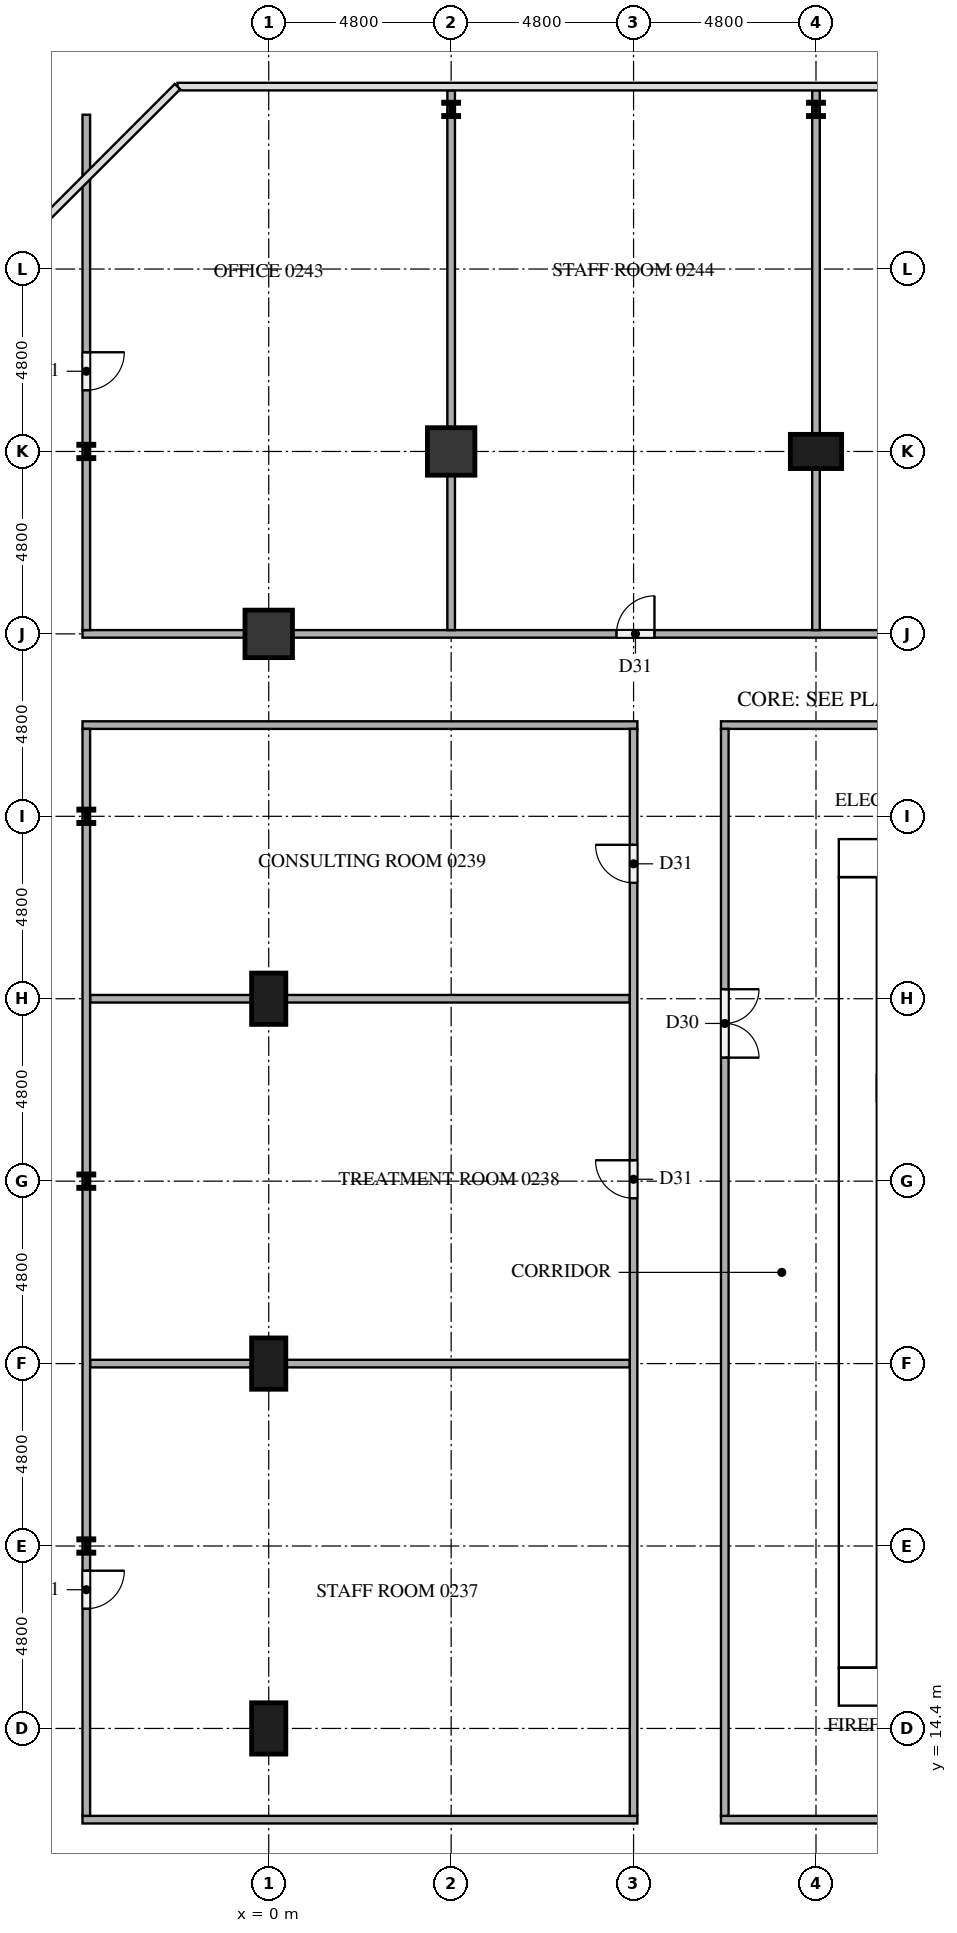
"""IFC4 building model, lengths in metres.
Left out: names, types, materials, properties, quantities, classifications, styles, units other than length and angle.
Written with IfcOpenShell. Run it as: python <this file> out.ifc"""

import sys

from ifc_helpers import new_model, si_unit, direction, frame, frame_2d, origin, origin_2d, place, context, subcontext, project, spatial, rectangle, i_section, extrude, element, fill, save


model = new_model("IFC4")
c1 = context("Model", 3, precision=1e-05, world=origin(), true_north=direction((0.0, 1.0)))
c2 = subcontext(c1, "Body", "Model", "MODEL_VIEW")
j1 = project(units=[si_unit("LENGTHUNIT", "METRE"), si_unit("PLANEANGLEUNIT", "RADIAN")], contexts=[c1])
p1 = place(None, origin())
s1 = spatial("IfcSite", under=j1, at=p1, CompositionType="ELEMENT")
p2 = place(p1, origin())
s2 = spatial("IfcBuilding", under=s1, at=p2, CompositionType="ELEMENT")
p3 = place(p2, frame((0.0, 0.0, 10.5)))
s3 = spatial("IfcBuildingStorey", under=s2, at=p3, CompositionType="ELEMENT", Elevation=10.5)
p4 = place(p3, frame((15.0, 15.5, 0.0), z_axis=(0.0, 0.0, 1.0), x_axis=(1.0, 0.0, 0.0)))
e1 = element("IfcWall", 1, at=p4, inside=s3, PredefinedType="SHEAR", context=c2, shape_type="SweptSolid", body=[
    extrude(rectangle(XDim=32.4, YDim=1.0, at=frame_2d((16.2, 0.0))), origin(), (0.0, 0.0, 1.0), 4.2),
])
p5 = place(p4, frame((15.3, 0.0, 0.0)))
e2 = element("IfcOpeningElement", 2, at=p5, cuts=e1, PredefinedType="OPENING", context=c2, shape_type="SweptSolid", body=[
    extrude(rectangle(XDim=1.8, YDim=2.1, at=frame_2d((0.9, 1.05))), frame((0.0, 0.51, 0.0), z_axis=(0.0, -1.0, 0.0), x_axis=(1.0, 0.0, 0.0)), (0.0, 0.0, 1.0), 1.02),
])
p6 = place(p3, frame((15.0, 37.3, 0.0), z_axis=(0.0, 0.0, 1.0), x_axis=(1.0, 0.0, 0.0)))
e3 = element("IfcWall", 3, at=p6, inside=s3, PredefinedType="SHEAR", context=c2, shape_type="SweptSolid", body=[
    extrude(rectangle(XDim=32.4, YDim=1.0, at=frame_2d((16.2, 0.0))), origin(), (0.0, 0.0, 1.0), 4.2),
])
p7 = place(p6, frame((15.3, 0.0, 0.0)))
e4 = element("IfcOpeningElement", 4, at=p7, cuts=e3, PredefinedType="OPENING", context=c2, shape_type="SweptSolid", body=[
    extrude(rectangle(XDim=1.8, YDim=2.1, at=frame_2d((0.9, 1.05))), frame((0.0, 0.51, 0.0), z_axis=(0.0, -1.0, 0.0), x_axis=(1.0, 0.0, 0.0)), (0.0, 0.0, 1.0), 1.02),
])
p8 = place(p6, frame((1.766, 0.0, 0.0)))
e5 = element("IfcOpeningElement", 5, at=p8, cuts=e3, PredefinedType="OPENING", context=c2, shape_type="SweptSolid", body=[
    extrude(rectangle(XDim=1.0, YDim=2.1, at=frame_2d((0.5, 1.05))), frame((0.0, 0.51, 0.0), z_axis=(0.0, -1.0, 0.0), x_axis=(1.0, 0.0, 0.0)), (0.0, 0.0, 1.0), 1.02),
])
p9 = place(p6, frame((5.241, 0.0, 0.0)))
e6 = element("IfcOpeningElement", 6, at=p9, cuts=e3, PredefinedType="OPENING", context=c2, shape_type="SweptSolid", body=[
    extrude(rectangle(XDim=1.0, YDim=2.1, at=frame_2d((0.5, 1.05))), frame((0.0, 0.51, 0.0), z_axis=(0.0, -1.0, 0.0), x_axis=(1.0, 0.0, 0.0)), (0.0, 0.0, 1.0), 1.02),
])
p10 = place(p3, frame((15.5, 16.0, 0.0), z_axis=(0.0, 0.0, 1.0), x_axis=(0.0, 1.0, 0.0)))
e7 = element("IfcWall", 7, at=p10, inside=s3, PredefinedType="SHEAR", context=c2, shape_type="SweptSolid", body=[
    extrude(rectangle(XDim=20.8, YDim=1.0, at=frame_2d((10.4, 0.0))), origin(), (0.0, 0.0, 1.0), 4.2),
])
p11 = place(p10, frame((4.76, 0.0, 0.0)))
e8 = element("IfcOpeningElement", 8, at=p11, cuts=e7, PredefinedType="OPENING", context=c2, shape_type="SweptSolid", body=[
    extrude(rectangle(XDim=1.2, YDim=2.1, at=frame_2d((0.6, 1.05))), frame((0.0, 0.51, 0.0), z_axis=(0.0, -1.0, 0.0), x_axis=(1.0, 0.0, 0.0)), (0.0, 0.0, 1.0), 1.02),
])
p12 = place(p3, frame((14.4, 48.0, 0.0), z_axis=(0.0, 0.0, 1.0), x_axis=(1.0, 0.0, 0.0)))
e9 = element("IfcColumn", 9, at=p12, inside=s3, PredefinedType="COLUMN", context=c2, shape_type="SweptSolid", body=[
    extrude(rectangle(XDim=1.35, YDim=0.9, at=origin_2d()), origin(), (0.0, 0.0, 1.0), 4.2),
])
for number, where, z_axis, x_axis in (
    (10, (4.8, 48.0, 0.0), (0.0, 0.0, 1.0), (1.0, 0.0, 0.0)),
    (11, (0.0, 43.2, 0.0), (0.0, 0.0, 1.0), (1.0, 0.0, 0.0)),
):
    element("IfcColumn", number, at=place(p3, frame(where, z_axis=z_axis, x_axis=x_axis)), inside=s3, PredefinedType="COLUMN", context=c2, shape_type="SweptSolid", body=[
        extrude(rectangle(XDim=1.25, YDim=1.25, at=origin_2d()), origin(), (0.0, 0.0, 1.0), 4.2),
    ])
for number, where, z_axis, x_axis in (
    (12, (0.0, 33.6, 0.0), (0.0, 0.0, 1.0), (0.0, 1.0, 0.0)),
    (13, (0.0, 24.0, 0.0), (0.0, 0.0, 1.0), (0.0, 1.0, 0.0)),
    (14, (0.0, 14.4, 0.0), (0.0, 0.0, 1.0), (0.0, 1.0, 0.0)),
):
    element("IfcColumn", number, at=place(p3, frame(where, z_axis=z_axis, x_axis=x_axis)), inside=s3, PredefinedType="COLUMN", context=c2, shape_type="SweptSolid", body=[
        extrude(rectangle(XDim=1.35, YDim=0.9, at=origin_2d()), origin(), (0.0, 0.0, 1.0), 4.2),
    ])
for number, where, z_axis, x_axis in (
    (15, (-4.8, 19.2, 0.0), (0.0, 0.0, 1.0), (1.0, 0.0, 0.0)),
    (16, (-4.8, 28.8, 0.0), (0.0, 0.0, 1.0), (1.0, 0.0, 0.0)),
    (17, (-4.8, 38.4, 0.0), (0.0, 0.0, 1.0), (1.0, 0.0, 0.0)),
    (18, (-4.8, 48.0, 0.0), (0.0, 0.0, 1.0), (1.0, 0.0, 0.0)),
    (19, (4.8, 57.0, 0.0), (0.0, 0.0, 1.0), (1.0, 0.0, 0.0)),
    (20, (14.4, 57.0, 0.0), (0.0, 0.0, 1.0), (1.0, 0.0, 0.0)),
):
    element("IfcColumn", number, at=place(p3, frame(where, z_axis=z_axis, x_axis=x_axis)), inside=s3, PredefinedType="COLUMN", context=c2, shape_type="SweptSolid", body=[
        extrude(i_section(OverallWidth=0.396, OverallDepth=0.381, WebThickness=0.019, FlangeThickness=0.03, at=origin_2d()), origin(), (0.0, 0.0, 1.0), 4.2),
    ])
p13 = place(p3, frame((-4.9, 12.0, 0.0), z_axis=(0.0, 0.0, 1.0), x_axis=(1.0, 0.0, 0.0)))
e21 = element("IfcWall", 21, at=p13, inside=s3, PredefinedType="PARTITIONING", context=c2, shape_type="SweptSolid", body=[
    extrude(rectangle(XDim=14.6, YDim=0.2, at=frame_2d((7.3, 0.0))), origin(), (0.0, 0.0, 1.0), 4.2),
])
p14 = place(p3, frame((11.9, 12.0, 0.0), z_axis=(0.0, 0.0, 1.0), x_axis=(1.0, 0.0, 0.0)))
e22 = element("IfcWall", 22, at=p14, inside=s3, PredefinedType="PARTITIONING", context=c2, shape_type="SweptSolid", body=[
    extrude(rectangle(XDim=38.6, YDim=0.2, at=frame_2d((19.3, 0.0))), origin(), (0.0, 0.0, 1.0), 4.2),
])
p15 = place(p14, frame((18.45, 0.0, 0.0)))
e23 = element("IfcOpeningElement", 23, at=p15, cuts=e22, PredefinedType="OPENING", context=c2, shape_type="SweptSolid", body=[
    extrude(rectangle(XDim=1.8, YDim=2.1, at=frame_2d((0.9, 1.05))), frame((0.0, 0.11, 0.0), z_axis=(0.0, -1.0, 0.0), x_axis=(1.0, 0.0, 0.0)), (0.0, 0.0, 1.0), 0.22),
])
for number, where, z_axis, x_axis in (
    (24, (-4.7, 24.0, 0.0), (0.0, 0.0, 1.0), (1.0, 0.0, 0.0)),
    (25, (-4.7, 33.6, 0.0), (0.0, 0.0, 1.0), (1.0, 0.0, 0.0)),
):
    element("IfcWall", number, at=place(p3, frame(where, z_axis=z_axis, x_axis=x_axis)), inside=s3, PredefinedType="PARTITIONING", context=c2, shape_type="SweptSolid", body=[
        extrude(rectangle(XDim=14.2, YDim=0.2, at=frame_2d((7.1, 0.0))), origin(), (0.0, 0.0, 1.0), 4.2),
    ])
p16 = place(p3, frame((-4.9, 40.8, 0.0), z_axis=(0.0, 0.0, 1.0), x_axis=(1.0, 0.0, 0.0)))
e26 = element("IfcWall", 26, at=p16, inside=s3, PredefinedType="PARTITIONING", context=c2, shape_type="SweptSolid", body=[
    extrude(rectangle(XDim=14.6, YDim=0.2, at=frame_2d((7.3, 0.0))), origin(), (0.0, 0.0, 1.0), 4.2),
])
p17 = place(p3, frame((50.5, 40.8, 0.0), z_axis=(0.0, 0.0, 1.0), x_axis=(-1.0, 0.0, 0.0)))
e27 = element("IfcWall", 27, at=p17, inside=s3, PredefinedType="PARTITIONING", context=c2, shape_type="SweptSolid", body=[
    extrude(rectangle(XDim=38.6, YDim=0.2, at=frame_2d((19.3, 0.0))), origin(), (0.0, 0.0, 1.0), 4.2),
])
p18 = place(p17, frame((18.45, 0.0, 0.0)))
e28 = element("IfcOpeningElement", 28, at=p18, cuts=e27, PredefinedType="OPENING", context=c2, shape_type="SweptSolid", body=[
    extrude(rectangle(XDim=1.8, YDim=2.1, at=frame_2d((0.9, 1.05))), frame((0.0, 0.11, 0.0), z_axis=(0.0, -1.0, 0.0), x_axis=(1.0, 0.0, 0.0)), (0.0, 0.0, 1.0), 0.22),
])
p19 = place(p17, frame((16.25, 0.0, 0.0)))
e29 = element("IfcOpeningElement", 29, at=p19, cuts=e27, PredefinedType="OPENING", context=c2, shape_type="SweptSolid", body=[
    extrude(rectangle(XDim=1.8, YDim=2.1, at=frame_2d((0.9, 1.05))), frame((0.0, 0.11, 0.0), z_axis=(0.0, -1.0, 0.0), x_axis=(1.0, 0.0, 0.0)), (0.0, 0.0, 1.0), 0.22),
])
p20 = place(p3, frame((-4.9, 43.2, 0.0), z_axis=(0.0, 0.0, 1.0), x_axis=(1.0, 0.0, 0.0)))
e30 = element("IfcWall", 30, at=p20, inside=s3, PredefinedType="PARTITIONING", context=c2, shape_type="SweptSolid", body=[
    extrude(rectangle(XDim=45.35, YDim=0.2, at=frame_2d((22.675, 0.0))), origin(), (0.0, 0.0, 1.0), 4.2),
])
p21 = place(p20, frame((14.05, 0.0, 0.0)))
e31 = element("IfcOpeningElement", 31, at=p21, cuts=e30, PredefinedType="OPENING", context=c2, shape_type="SweptSolid", body=[
    extrude(rectangle(XDim=1.0, YDim=2.1, at=frame_2d((0.5, 1.05))), frame((0.0, 0.11, 0.0), z_axis=(0.0, -1.0, 0.0), x_axis=(1.0, 0.0, 0.0)), (0.0, 0.0, 1.0), 0.22),
])
p22 = place(p20, frame((23.55, 0.0, 0.0)))
e32 = element("IfcOpeningElement", 32, at=p22, cuts=e30, PredefinedType="OPENING", context=c2, shape_type="SweptSolid", body=[
    extrude(rectangle(XDim=1.0, YDim=2.1, at=frame_2d((0.5, 1.05))), frame((0.0, 0.11, 0.0), z_axis=(0.0, -1.0, 0.0), x_axis=(1.0, 0.0, 0.0)), (0.0, 0.0, 1.0), 0.22),
])
p23 = place(p20, frame((33.25, 0.0, 0.0)))
e33 = element("IfcOpeningElement", 33, at=p23, cuts=e30, PredefinedType="OPENING", context=c2, shape_type="SweptSolid", body=[
    extrude(rectangle(XDim=1.0, YDim=2.1, at=frame_2d((0.5, 1.05))), frame((0.0, 0.11, 0.0), z_axis=(0.0, -1.0, 0.0), x_axis=(1.0, 0.0, 0.0)), (0.0, 0.0, 1.0), 0.22),
])
p24 = place(p3, frame((-4.8, 40.7, 0.0), z_axis=(0.0, 0.0, 1.0), x_axis=(0.0, -1.0, 0.0)))
e34 = element("IfcWall", 34, at=p24, inside=s3, PredefinedType="PARTITIONING", context=c2, shape_type="SweptSolid", body=[
    extrude(rectangle(XDim=28.6, YDim=0.2, at=frame_2d((14.3, 0.0))), origin(), (0.0, 0.0, 1.0), 4.2),
])
p25 = place(p24, frame((22.15, 0.0, 0.0)))
e35 = element("IfcOpeningElement", 35, at=p25, cuts=e34, PredefinedType="OPENING", context=c2, shape_type="SweptSolid", body=[
    extrude(rectangle(XDim=1.0, YDim=2.1, at=frame_2d((0.5, 1.05))), frame((0.0, 0.11, 0.0), z_axis=(0.0, -1.0, 0.0), x_axis=(1.0, 0.0, 0.0)), (0.0, 0.0, 1.0), 0.22),
])
p26 = place(p3, frame((-4.8, 56.86, 0.0), z_axis=(0.0, 0.0, 1.0), x_axis=(0.0, -1.0, 0.0)))
e36 = element("IfcWall", 36, at=p26, inside=s3, PredefinedType="PARTITIONING", context=c2, shape_type="SweptSolid", body=[
    extrude(rectangle(XDim=13.56, YDim=0.2, at=frame_2d((6.78, 0.0))), origin(), (0.0, 0.0, 1.0), 4.2),
])
p27 = place(p26, frame((6.25, 0.0, 0.0)))
e37 = element("IfcOpeningElement", 37, at=p27, cuts=e36, PredefinedType="OPENING", context=c2, shape_type="SweptSolid", body=[
    extrude(rectangle(XDim=1.0, YDim=2.1, at=frame_2d((0.5, 1.05))), frame((0.0, 0.11, 0.0), z_axis=(0.0, -1.0, 0.0), x_axis=(1.0, 0.0, 0.0)), (0.0, 0.0, 1.0), 0.22),
])
p28 = place(p3, frame((4.8, 43.3, 0.0), z_axis=(0.0, 0.0, 1.0), x_axis=(0.0, 1.0, 0.0)))
e38 = element("IfcWall", 38, at=p28, inside=s3, PredefinedType="PARTITIONING", context=c2, shape_type="SweptSolid", body=[
    extrude(rectangle(XDim=14.2, YDim=0.2, at=frame_2d((7.1, 0.0))), origin(), (0.0, 0.0, 1.0), 4.2),
])
p29 = place(p3, frame((9.6, 12.1, 0.0), z_axis=(0.0, 0.0, 1.0), x_axis=(0.0, 1.0, 0.0)))
e39 = element("IfcWall", 39, at=p29, inside=s3, PredefinedType="PARTITIONING", context=c2, shape_type="SweptSolid", body=[
    extrude(rectangle(XDim=28.6, YDim=0.2, at=frame_2d((14.3, 0.0))), origin(), (0.0, 0.0, 1.0), 4.2),
])
p30 = place(p29, frame((16.25, 0.0, 0.0)))
e40 = element("IfcOpeningElement", 40, at=p30, cuts=e39, PredefinedType="OPENING", context=c2, shape_type="SweptSolid", body=[
    extrude(rectangle(XDim=1.0, YDim=2.1, at=frame_2d((0.5, 1.05))), frame((0.0, 0.11, 0.0), z_axis=(0.0, -1.0, 0.0), x_axis=(1.0, 0.0, 0.0)), (0.0, 0.0, 1.0), 0.22),
])
p31 = place(p29, frame((24.55, 0.0, 0.0)))
e41 = element("IfcOpeningElement", 41, at=p31, cuts=e39, PredefinedType="OPENING", context=c2, shape_type="SweptSolid", body=[
    extrude(rectangle(XDim=1.0, YDim=2.1, at=frame_2d((0.5, 1.05))), frame((0.0, 0.11, 0.0), z_axis=(0.0, -1.0, 0.0), x_axis=(1.0, 0.0, 0.0)), (0.0, 0.0, 1.0), 0.22),
])
p32 = place(p3, frame((12.0, 40.7, 0.0), z_axis=(0.0, 0.0, 1.0), x_axis=(0.0, -1.0, 0.0)))
e42 = element("IfcWall", 42, at=p32, inside=s3, PredefinedType="PARTITIONING", context=c2, shape_type="SweptSolid", body=[
    extrude(rectangle(XDim=28.6, YDim=0.2, at=frame_2d((14.3, 0.0))), origin(), (0.0, 0.0, 1.0), 4.2),
])
p33 = place(p32, frame((6.85, 0.0, 0.0)))
e43 = element("IfcOpeningElement", 43, at=p33, cuts=e42, PredefinedType="OPENING", context=c2, shape_type="SweptSolid", body=[
    extrude(rectangle(XDim=1.8, YDim=2.1, at=frame_2d((0.9, 1.05))), frame((0.0, 0.11, 0.0), z_axis=(0.0, -1.0, 0.0), x_axis=(1.0, 0.0, 0.0)), (0.0, 0.0, 1.0), 0.22),
])
p34 = place(p3, frame((14.4, 43.3, 0.0), z_axis=(0.0, 0.0, 1.0), x_axis=(0.0, 1.0, 0.0)))
e44 = element("IfcWall", 44, at=p34, inside=s3, PredefinedType="PARTITIONING", context=c2, shape_type="SweptSolid", body=[
    extrude(rectangle(XDim=14.2, YDim=0.2, at=frame_2d((7.1, 0.0))), origin(), (0.0, 0.0, 1.0), 4.2),
])
p35 = place(p11, frame((1.2, 0.0, 0.0), z_axis=(0.0, 0.0, 1.0), x_axis=(-1.0, 0.0, 0.0)))
e45 = element("IfcDoor", 45, at=p35, inside=s3, OperationType="SINGLE_SWING_LEFT", PredefinedType="DOOR", context=c2, shape_type="SweptSolid", body=[
    extrude(rectangle(XDim=1.2, YDim=2.1, at=frame_2d((0.6, 1.05))), frame((0.0, 0.025, 0.0), z_axis=(0.0, -1.0, 0.0), x_axis=(1.0, 0.0, 0.0)), (0.0, 0.0, 1.0), 0.05),
])
fill(e8, e45)
p36 = place(p25, origin())
e46 = element("IfcDoor", 46, at=p36, inside=s3, OperationType="SINGLE_SWING_LEFT", PredefinedType="DOOR", context=c2, shape_type="SweptSolid", body=[
    extrude(rectangle(XDim=1.0, YDim=2.1, at=frame_2d((0.5, 1.05))), frame((0.0, 0.025, 0.0), z_axis=(0.0, -1.0, 0.0), x_axis=(1.0, 0.0, 0.0)), (0.0, 0.0, 1.0), 0.05),
])
fill(e35, e46)
p37 = place(p30, origin())
e47 = element("IfcDoor", 47, at=p37, inside=s3, OperationType="SINGLE_SWING_RIGHT", PredefinedType="DOOR", context=c2, shape_type="SweptSolid", body=[
    extrude(rectangle(XDim=1.0, YDim=2.1, at=frame_2d((0.5, 1.05))), frame((0.0, 0.025, 0.0), z_axis=(0.0, -1.0, 0.0), x_axis=(1.0, 0.0, 0.0)), (0.0, 0.0, 1.0), 0.05),
])
fill(e40, e47)
p38 = place(p31, origin())
e48 = element("IfcDoor", 48, at=p38, inside=s3, OperationType="SINGLE_SWING_RIGHT", PredefinedType="DOOR", context=c2, shape_type="SweptSolid", body=[
    extrude(rectangle(XDim=1.0, YDim=2.1, at=frame_2d((0.5, 1.05))), frame((0.0, 0.025, 0.0), z_axis=(0.0, -1.0, 0.0), x_axis=(1.0, 0.0, 0.0)), (0.0, 0.0, 1.0), 0.05),
])
fill(e41, e48)
p39 = place(p27, origin())
e49 = element("IfcDoor", 49, at=p39, inside=s3, OperationType="SINGLE_SWING_LEFT", PredefinedType="DOOR", context=c2, shape_type="SweptSolid", body=[
    extrude(rectangle(XDim=1.0, YDim=2.1, at=frame_2d((0.5, 1.05))), frame((0.0, 0.025, 0.0), z_axis=(0.0, -1.0, 0.0), x_axis=(1.0, 0.0, 0.0)), (0.0, 0.0, 1.0), 0.05),
])
fill(e37, e49)
p40 = place(p21, origin())
e50 = element("IfcDoor", 50, at=p40, inside=s3, OperationType="SINGLE_SWING_RIGHT", PredefinedType="DOOR", context=c2, shape_type="SweptSolid", body=[
    extrude(rectangle(XDim=1.0, YDim=2.1, at=frame_2d((0.5, 1.05))), frame((0.0, 0.025, 0.0), z_axis=(0.0, -1.0, 0.0), x_axis=(1.0, 0.0, 0.0)), (0.0, 0.0, 1.0), 0.05),
])
fill(e31, e50)
p41 = place(p33, origin())
e51 = element("IfcDoor", 51, at=p41, inside=s3, OperationType="DOUBLE_DOOR_SINGLE_SWING", PredefinedType="DOOR", context=c2, shape_type="SweptSolid", body=[
    extrude(rectangle(XDim=1.8, YDim=2.1, at=frame_2d((0.9, 1.05))), frame((0.0, 0.025, 0.0), z_axis=(0.0, -1.0, 0.0), x_axis=(1.0, 0.0, 0.0)), (0.0, 0.0, 1.0), 0.05),
])
fill(e43, e51)
save(model, sys.argv[1])
